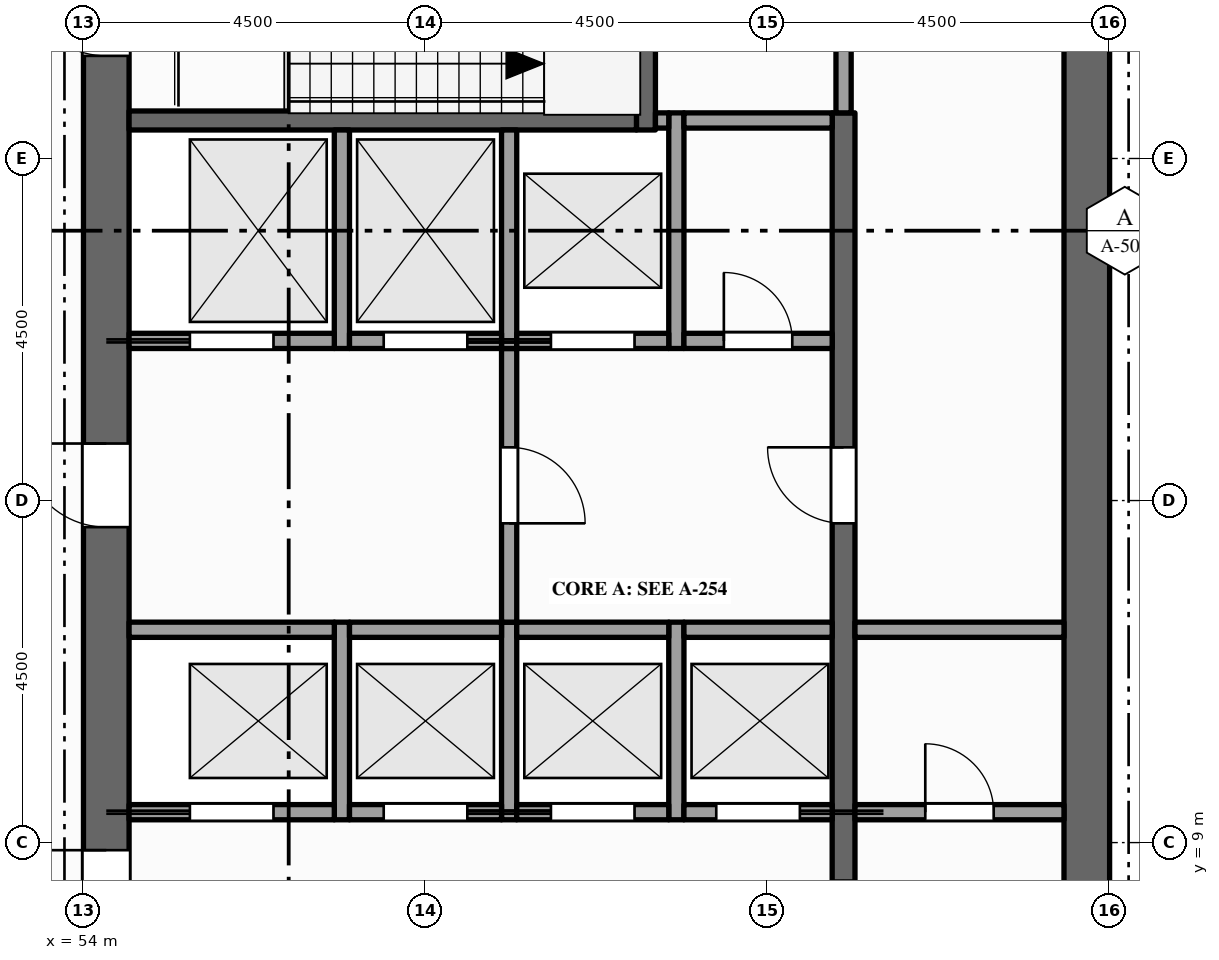
"""IFC4 building model, lengths in metres.
Left out: names, types, materials, properties, quantities, classifications, styles, units other than length and angle.
Written with IfcOpenShell. Run it as: python <this file> out.ifc"""

import sys

from ifc_helpers import new_model, si_unit, direction, frame, frame_2d, origin, place, context, subcontext, project, spatial, rectangle, extrude, element, fill, save


model = new_model("IFC4")
c1 = context("Model", 3, precision=1e-05, world=origin(), true_north=direction((0.0, 1.0)))
c2 = subcontext(c1, "Body", "Model", "MODEL_VIEW")
j1 = project(units=[si_unit("LENGTHUNIT", "METRE"), si_unit("PLANEANGLEUNIT", "RADIAN")], contexts=[c1])
p1 = place(None, origin())
s1 = spatial("IfcSite", under=j1, at=p1, CompositionType="ELEMENT")
p2 = place(p1, origin())
s2 = spatial("IfcBuilding", under=s1, at=p2, CompositionType="ELEMENT")
p3 = place(p2, frame((0.0, 0.0, 305.0)))
s3 = spatial("IfcBuildingStorey", under=s2, at=p3, CompositionType="ELEMENT", Elevation=305.0)
p4 = place(p3, frame((54.3, 0.6, -0.15), z_axis=(0.0, 0.0, 1.0), x_axis=(0.0, 1.0, 0.0)))
e1 = element("IfcWall", 1, at=p4, inside=s3, PredefinedType="SHEAR", context=c2, shape_type="SweptSolid", body=[
    extrude(rectangle(XDim=21.3, YDim=0.6, at=frame_2d((10.65, 0.0))), origin(), (0.0, 0.0, 1.0), 4.5),
])
p5 = place(p4, frame((6.5, 0.0, 0.15)))
e2 = element("IfcOpeningElement", 2, at=p5, cuts=e1, PredefinedType="OPENING", context=c2, shape_type="SweptSolid", body=[
    extrude(rectangle(XDim=1.8, YDim=2.1, at=frame_2d((0.9, 1.05))), frame((0.0, 0.31, 0.0), z_axis=(0.0, -1.0, 0.0), x_axis=(1.0, 0.0, 0.0)), (0.0, 0.0, 1.0), 0.62),
])
p6 = place(p4, frame((12.55, 0.0, 0.15)))
e3 = element("IfcOpeningElement", 3, at=p6, cuts=e1, PredefinedType="OPENING", context=c2, shape_type="SweptSolid", body=[
    extrude(rectangle(XDim=1.1, YDim=2.1, at=frame_2d((0.55, 1.05))), frame((0.0, 0.31, 0.0), z_axis=(0.0, -1.0, 0.0), x_axis=(1.0, 0.0, 0.0)), (0.0, 0.0, 1.0), 0.62),
])
p7 = place(p4, frame((1.55, 0.0, 0.15)))
e4 = element("IfcOpeningElement", 4, at=p7, cuts=e1, PredefinedType="OPENING", context=c2, shape_type="SweptSolid", body=[
    extrude(rectangle(XDim=1.1, YDim=2.1, at=frame_2d((0.55, 1.05))), frame((0.0, 0.31, 0.0), z_axis=(0.0, -1.0, 0.0), x_axis=(1.0, 0.0, 0.0)), (0.0, 0.0, 1.0), 0.62),
])
p8 = place(p4, frame((18.75, 0.0, 0.15)))
e5 = element("IfcOpeningElement", 5, at=p8, cuts=e1, PredefinedType="OPENING", context=c2, shape_type="SweptSolid", body=[
    extrude(rectangle(XDim=1.1, YDim=2.1, at=frame_2d((0.55, 1.05))), frame((0.0, 0.31, 0.0), z_axis=(0.0, -1.0, 0.0), x_axis=(1.0, 0.0, 0.0)), (0.0, 0.0, 1.0), 0.62),
])
p9 = place(p3, frame((67.2, 0.6, -0.15), z_axis=(0.0, 0.0, 1.0), x_axis=(0.0, 1.0, 0.0)))
e6 = element("IfcWall", 6, at=p9, inside=s3, PredefinedType="SHEAR", context=c2, shape_type="SweptSolid", body=[
    extrude(rectangle(XDim=21.3, YDim=0.6, at=frame_2d((10.65, 0.0))), origin(), (0.0, 0.0, 1.0), 4.5),
])
p10 = place(p3, frame((57.4, 9.3, 0.0), z_axis=(0.0, 0.0, 1.0), x_axis=(0.0, 1.0, 0.0)))
e7 = element("IfcWall", 7, at=p10, inside=s3, PredefinedType="SOLIDWALL", context=c2, shape_type="SweptSolid", body=[
    extrude(rectangle(XDim=2.6, YDim=0.2, at=frame_2d((1.3, 0.0))), origin(), (0.0, 0.0, 1.0), 4.35),
])
p11 = place(p3, frame((57.4, 15.5, 0.0), z_axis=(0.0, 0.0, 1.0), x_axis=(0.0, 1.0, 0.0)))
e8 = element("IfcWall", 8, at=p11, inside=s3, PredefinedType="SOLIDWALL", context=c2, shape_type="SweptSolid", body=[
    extrude(rectangle(XDim=2.875, YDim=0.2, at=frame_2d((1.438, 0.0))), origin(), (0.0, 0.0, 1.0), 4.35),
])
p12 = place(p3, frame((59.6, 9.3, 0.0), z_axis=(0.0, 0.0, 1.0), x_axis=(0.0, 1.0, 0.0)))
e9 = element("IfcWall", 9, at=p12, inside=s3, PredefinedType="SOLIDWALL", context=c2, shape_type="SweptSolid", body=[
    extrude(rectangle(XDim=2.6, YDim=0.2, at=frame_2d((1.3, 0.0))), origin(), (0.0, 0.0, 1.0), 4.35),
])
p13 = place(p3, frame((59.6, 11.9, 0.0), z_axis=(0.0, 0.0, 1.0), x_axis=(0.0, 1.0, 0.0)))
e10 = element("IfcWall", 10, at=p13, inside=s3, PredefinedType="PARTITIONING", context=c2, shape_type="SweptSolid", body=[
    extrude(rectangle(XDim=3.6, YDim=0.2, at=frame_2d((1.8, 0.0))), origin(), (0.0, 0.0, 1.0), 4.35),
])
p14 = place(p13, frame((1.3, 0.0, 0.0)))
e11 = element("IfcOpeningElement", 11, at=p14, cuts=e10, PredefinedType="OPENING", context=c2, shape_type="SweptSolid", body=[
    extrude(rectangle(XDim=1.0, YDim=2.1, at=frame_2d((0.5, 1.05))), frame((0.0, 0.11, 0.0), z_axis=(0.0, -1.0, 0.0), x_axis=(1.0, 0.0, 0.0)), (0.0, 0.0, 1.0), 0.22),
])
p15 = place(p3, frame((59.6, 15.5, 0.0), z_axis=(0.0, 0.0, 1.0), x_axis=(0.0, 1.0, 0.0)))
e12 = element("IfcWall", 12, at=p15, inside=s3, PredefinedType="SOLIDWALL", context=c2, shape_type="SweptSolid", body=[
    extrude(rectangle(XDim=2.875, YDim=0.2, at=frame_2d((1.438, 0.0))), origin(), (0.0, 0.0, 1.0), 4.35),
])
p16 = place(p3, frame((61.4, 18.375, 0.0), z_axis=(0.0, 0.0, 1.0), x_axis=(0.0, 1.0, 0.0)))
e13 = element("IfcWall", 13, at=p16, inside=s3, PredefinedType="SHEAR", context=c2, shape_type="SweptSolid", body=[
    extrude(rectangle(XDim=3.525, YDim=0.25, at=frame_2d((1.762, 0.0))), origin(), (0.0, 0.0, 1.0), 4.35),
])
p17 = place(p3, frame((61.8, 9.3, 0.0), z_axis=(0.0, 0.0, 1.0), x_axis=(0.0, 1.0, 0.0)))
e14 = element("IfcWall", 14, at=p17, inside=s3, PredefinedType="SOLIDWALL", context=c2, shape_type="SweptSolid", body=[
    extrude(rectangle(XDim=2.6, YDim=0.2, at=frame_2d((1.3, 0.0))), origin(), (0.0, 0.0, 1.0), 4.35),
])
p18 = place(p3, frame((61.8, 15.5, 0.0), z_axis=(0.0, 0.0, 1.0), x_axis=(0.0, 1.0, 0.0)))
e15 = element("IfcWall", 15, at=p18, inside=s3, PredefinedType="SOLIDWALL", context=c2, shape_type="SweptSolid", body=[
    extrude(rectangle(XDim=3.1, YDim=0.2, at=frame_2d((1.55, 0.0))), origin(), (0.0, 0.0, 1.0), 4.35),
])
p19 = place(p3, frame((64.0, 4.1, 0.0), z_axis=(0.0, 0.0, 1.0), x_axis=(0.0, 1.0, 0.0)))
e16 = element("IfcWall", 16, at=p19, inside=s3, PredefinedType="SHEAR", context=c2, shape_type="SweptSolid", body=[
    extrude(rectangle(XDim=14.5, YDim=0.3, at=frame_2d((7.25, 0.0))), origin(), (0.0, 0.0, 1.0), 4.35),
])
p20 = place(p19, frame((3.4, 0.0, 0.0)))
e17 = element("IfcOpeningElement", 17, at=p20, cuts=e16, PredefinedType="OPENING", context=c2, shape_type="SweptSolid", body=[
    extrude(rectangle(XDim=1.0, YDim=2.1, at=frame_2d((0.5, 1.05))), frame((0.0, 0.16, 0.0), z_axis=(0.0, -1.0, 0.0), x_axis=(1.0, 0.0, 0.0)), (0.0, 0.0, 1.0), 0.32),
])
p21 = place(p19, frame((9.1, 0.0, 0.0)))
e18 = element("IfcOpeningElement", 18, at=p21, cuts=e16, PredefinedType="OPENING", context=c2, shape_type="SweptSolid", body=[
    extrude(rectangle(XDim=1.0, YDim=2.1, at=frame_2d((0.5, 1.05))), frame((0.0, 0.16, 0.0), z_axis=(0.0, -1.0, 0.0), x_axis=(1.0, 0.0, 0.0)), (0.0, 0.0, 1.0), 0.32),
])
p22 = place(p3, frame((64.0, 18.6, 0.0), z_axis=(0.0, 0.0, 1.0), x_axis=(0.0, 1.0, 0.0)))
e19 = element("IfcWall", 19, at=p22, inside=s3, PredefinedType="PARTITIONING", context=c2, shape_type="SweptSolid", body=[
    extrude(rectangle(XDim=3.3, YDim=0.2, at=frame_2d((1.65, 0.0))), origin(), (0.0, 0.0, 1.0), 4.35),
])
p23 = place(p22, frame((1.2, 0.0, 0.0)))
e20 = element("IfcOpeningElement", 20, at=p23, cuts=e19, PredefinedType="OPENING", context=c2, shape_type="SweptSolid", body=[
    extrude(rectangle(XDim=0.9, YDim=2.1, at=frame_2d((0.45, 1.05))), frame((0.0, 0.11, 0.0), z_axis=(0.0, -1.0, 0.0), x_axis=(1.0, 0.0, 0.0)), (0.0, 0.0, 1.0), 0.22),
])
p24 = place(p3, frame((54.6, 9.4, 0.0), z_axis=(0.0, 0.0, 1.0), x_axis=(1.0, 0.0, 0.0)))
e21 = element("IfcWall", 21, at=p24, inside=s3, PredefinedType="SOLIDWALL", context=c2, shape_type="SweptSolid", body=[
    extrude(rectangle(XDim=2.7, YDim=0.2, at=frame_2d((1.35, 0.0))), origin(), (0.0, 0.0, 1.0), 4.35),
])
p25 = place(p24, frame((0.8, 0.0, 0.012)))
e22 = element("IfcOpeningElement", 22, at=p25, cuts=e21, PredefinedType="OPENING", context=c2, shape_type="SweptSolid", body=[
    extrude(rectangle(XDim=1.1, YDim=2.1, at=frame_2d((0.55, 1.05))), frame((0.0, 0.11, 0.0), z_axis=(0.0, -1.0, 0.0), x_axis=(1.0, 0.0, 0.0)), (0.0, 0.0, 1.0), 0.22),
])
p26 = place(p3, frame((57.5, 9.4, 0.0), z_axis=(0.0, 0.0, 1.0), x_axis=(1.0, 0.0, 0.0)))
e23 = element("IfcWall", 23, at=p26, inside=s3, PredefinedType="SOLIDWALL", context=c2, shape_type="SweptSolid", body=[
    extrude(rectangle(XDim=2.0, YDim=0.2, at=frame_2d((1.0, 0.0))), origin(), (0.0, 0.0, 1.0), 4.35),
])
p27 = place(p26, frame((0.45, 0.0, 0.012)))
e24 = element("IfcOpeningElement", 24, at=p27, cuts=e23, PredefinedType="OPENING", context=c2, shape_type="SweptSolid", body=[
    extrude(rectangle(XDim=1.1, YDim=2.1, at=frame_2d((0.55, 1.05))), frame((0.0, 0.11, 0.0), z_axis=(0.0, -1.0, 0.0), x_axis=(1.0, 0.0, 0.0)), (0.0, 0.0, 1.0), 0.22),
])
p28 = place(p3, frame((59.7, 9.4, 0.0), z_axis=(0.0, 0.0, 1.0), x_axis=(1.0, 0.0, 0.0)))
e25 = element("IfcWall", 25, at=p28, inside=s3, PredefinedType="SOLIDWALL", context=c2, shape_type="SweptSolid", body=[
    extrude(rectangle(XDim=2.0, YDim=0.2, at=frame_2d((1.0, 0.0))), origin(), (0.0, 0.0, 1.0), 4.35),
])
p29 = place(p28, frame((0.45, 0.0, 0.012)))
e26 = element("IfcOpeningElement", 26, at=p29, cuts=e25, PredefinedType="OPENING", context=c2, shape_type="SweptSolid", body=[
    extrude(rectangle(XDim=1.1, YDim=2.1, at=frame_2d((0.55, 1.05))), frame((0.0, 0.11, 0.0), z_axis=(0.0, -1.0, 0.0), x_axis=(1.0, 0.0, 0.0)), (0.0, 0.0, 1.0), 0.22),
])
p30 = place(p3, frame((61.9, 9.4, 0.0), z_axis=(0.0, 0.0, 1.0), x_axis=(1.0, 0.0, 0.0)))
e27 = element("IfcWall", 27, at=p30, inside=s3, PredefinedType="SOLIDWALL", context=c2, shape_type="SweptSolid", body=[
    extrude(rectangle(XDim=1.95, YDim=0.2, at=frame_2d((0.975, 0.0))), origin(), (0.0, 0.0, 1.0), 4.35),
])
p31 = place(p30, frame((0.425, 0.0, 0.012)))
e28 = element("IfcOpeningElement", 28, at=p31, cuts=e27, PredefinedType="OPENING", context=c2, shape_type="SweptSolid", body=[
    extrude(rectangle(XDim=1.1, YDim=2.1, at=frame_2d((0.55, 1.05))), frame((0.0, 0.11, 0.0), z_axis=(0.0, -1.0, 0.0), x_axis=(1.0, 0.0, 0.0)), (0.0, 0.0, 1.0), 0.22),
])
p32 = place(p3, frame((64.15, 9.4, 0.0), z_axis=(0.0, 0.0, 1.0), x_axis=(1.0, 0.0, 0.0)))
e29 = element("IfcWall", 29, at=p32, inside=s3, PredefinedType="PARTITIONING", context=c2, shape_type="SweptSolid", body=[
    extrude(rectangle(XDim=2.75, YDim=0.2, at=frame_2d((1.375, 0.0))), origin(), (0.0, 0.0, 1.0), 4.35),
])
p33 = place(p32, frame((0.925, 0.0, 0.0)))
e30 = element("IfcOpeningElement", 30, at=p33, cuts=e29, PredefinedType="OPENING", context=c2, shape_type="SweptSolid", body=[
    extrude(rectangle(XDim=0.9, YDim=2.1, at=frame_2d((0.45, 1.05))), frame((0.0, 0.11, 0.0), z_axis=(0.0, -1.0, 0.0), x_axis=(1.0, 0.0, 0.0)), (0.0, 0.0, 1.0), 0.22),
])
p34 = place(p3, frame((54.6, 11.8, 0.0), z_axis=(0.0, 0.0, 1.0), x_axis=(1.0, 0.0, 0.0)))
e31 = element("IfcWall", 31, at=p34, inside=s3, PredefinedType="SOLIDWALL", context=c2, shape_type="SweptSolid", body=[
    extrude(rectangle(XDim=2.7, YDim=0.2, at=frame_2d((1.35, 0.0))), origin(), (0.0, 0.0, 1.0), 4.35),
])
for number, where, z_axis, x_axis in (
    (32, (57.5, 11.8, 0.0), (0.0, 0.0, 1.0), (1.0, 0.0, 0.0)),
    (33, (59.7, 11.8, 0.0), (0.0, 0.0, 1.0), (1.0, 0.0, 0.0)),
):
    element("IfcWall", number, at=place(p3, frame(where, z_axis=z_axis, x_axis=x_axis)), inside=s3, PredefinedType="SOLIDWALL", context=c2, shape_type="SweptSolid", body=[
        extrude(rectangle(XDim=2.0, YDim=0.2, at=frame_2d((1.0, 0.0))), origin(), (0.0, 0.0, 1.0), 4.35),
    ])
p35 = place(p3, frame((61.9, 11.8, 0.0), z_axis=(0.0, 0.0, 1.0), x_axis=(1.0, 0.0, 0.0)))
e34 = element("IfcWall", 34, at=p35, inside=s3, PredefinedType="SOLIDWALL", context=c2, shape_type="SweptSolid", body=[
    extrude(rectangle(XDim=1.95, YDim=0.2, at=frame_2d((0.975, 0.0))), origin(), (0.0, 0.0, 1.0), 4.35),
])
p36 = place(p3, frame((64.15, 11.8, 0.0), z_axis=(0.0, 0.0, 1.0), x_axis=(1.0, 0.0, 0.0)))
e35 = element("IfcWall", 35, at=p36, inside=s3, PredefinedType="PARTITIONING", context=c2, shape_type="SweptSolid", body=[
    extrude(rectangle(XDim=2.75, YDim=0.2, at=frame_2d((1.375, 0.0))), origin(), (0.0, 0.0, 1.0), 4.35),
])
p37 = place(p3, frame((54.6, 15.6, 0.0), z_axis=(0.0, 0.0, 1.0), x_axis=(1.0, 0.0, 0.0)))
e36 = element("IfcWall", 36, at=p37, inside=s3, PredefinedType="SOLIDWALL", context=c2, shape_type="SweptSolid", body=[
    extrude(rectangle(XDim=2.7, YDim=0.2, at=frame_2d((1.35, 0.0))), origin(), (0.0, 0.0, 1.0), 4.35),
])
p38 = place(p37, frame((0.8, 0.0, 0.012)))
e37 = element("IfcOpeningElement", 37, at=p38, cuts=e36, PredefinedType="OPENING", context=c2, shape_type="SweptSolid", body=[
    extrude(rectangle(XDim=1.1, YDim=2.1, at=frame_2d((0.55, 1.05))), frame((0.0, 0.11, 0.0), z_axis=(0.0, -1.0, 0.0), x_axis=(1.0, 0.0, 0.0)), (0.0, 0.0, 1.0), 0.22),
])
p39 = place(p3, frame((57.5, 15.6, 0.0), z_axis=(0.0, 0.0, 1.0), x_axis=(1.0, 0.0, 0.0)))
e38 = element("IfcWall", 38, at=p39, inside=s3, PredefinedType="SOLIDWALL", context=c2, shape_type="SweptSolid", body=[
    extrude(rectangle(XDim=2.0, YDim=0.2, at=frame_2d((1.0, 0.0))), origin(), (0.0, 0.0, 1.0), 4.35),
])
p40 = place(p39, frame((0.45, 0.0, 0.012)))
e39 = element("IfcOpeningElement", 39, at=p40, cuts=e38, PredefinedType="OPENING", context=c2, shape_type="SweptSolid", body=[
    extrude(rectangle(XDim=1.1, YDim=2.1, at=frame_2d((0.55, 1.05))), frame((0.0, 0.11, 0.0), z_axis=(0.0, -1.0, 0.0), x_axis=(1.0, 0.0, 0.0)), (0.0, 0.0, 1.0), 0.22),
])
p41 = place(p3, frame((59.7, 15.6, 0.0), z_axis=(0.0, 0.0, 1.0), x_axis=(1.0, 0.0, 0.0)))
e40 = element("IfcWall", 40, at=p41, inside=s3, PredefinedType="SOLIDWALL", context=c2, shape_type="SweptSolid", body=[
    extrude(rectangle(XDim=2.0, YDim=0.2, at=frame_2d((1.0, 0.0))), origin(), (0.0, 0.0, 1.0), 4.35),
])
p42 = place(p41, frame((0.45, 0.0, 0.012)))
e41 = element("IfcOpeningElement", 41, at=p42, cuts=e40, PredefinedType="OPENING", context=c2, shape_type="SweptSolid", body=[
    extrude(rectangle(XDim=1.1, YDim=2.1, at=frame_2d((0.55, 1.05))), frame((0.0, 0.11, 0.0), z_axis=(0.0, -1.0, 0.0), x_axis=(1.0, 0.0, 0.0)), (0.0, 0.0, 1.0), 0.22),
])
p43 = place(p3, frame((61.9, 15.6, 0.0), z_axis=(0.0, 0.0, 1.0), x_axis=(1.0, 0.0, 0.0)))
e42 = element("IfcWall", 42, at=p43, inside=s3, PredefinedType="PARTITIONING", context=c2, shape_type="SweptSolid", body=[
    extrude(rectangle(XDim=1.95, YDim=0.2, at=frame_2d((0.975, 0.0))), origin(), (0.0, 0.0, 1.0), 4.35),
])
p44 = place(p43, frame((0.525, 0.0, 0.0)))
e43 = element("IfcOpeningElement", 43, at=p44, cuts=e42, PredefinedType="OPENING", context=c2, shape_type="SweptSolid", body=[
    extrude(rectangle(XDim=0.9, YDim=2.1, at=frame_2d((0.45, 1.05))), frame((0.0, 0.11, 0.0), z_axis=(0.0, -1.0, 0.0), x_axis=(1.0, 0.0, 0.0)), (0.0, 0.0, 1.0), 0.22),
])
p45 = place(p3, frame((54.6, 18.5, 0.0), z_axis=(0.0, 0.0, 1.0), x_axis=(1.0, 0.0, 0.0)))
e44 = element("IfcWall", 44, at=p45, inside=s3, PredefinedType="SHEAR", context=c2, shape_type="SweptSolid", body=[
    extrude(rectangle(XDim=6.675, YDim=0.25, at=frame_2d((3.337, 0.0))), origin(), (0.0, 0.0, 1.0), 4.35),
])
p46 = place(p3, frame((61.525, 18.5, 0.0), z_axis=(0.0, 0.0, 1.0), x_axis=(1.0, 0.0, 0.0)))
e45 = element("IfcWall", 45, at=p46, inside=s3, PredefinedType="SOLIDWALL", context=c2, shape_type="SweptSolid", body=[
    extrude(rectangle(XDim=0.175, YDim=0.2, at=frame_2d((0.087, 0.0))), origin(), (0.0, 0.0, 1.0), 4.35),
])
p47 = place(p3, frame((61.9, 18.5, 0.0), z_axis=(0.0, 0.0, 1.0), x_axis=(1.0, 0.0, 0.0)))
e46 = element("IfcWall", 46, at=p47, inside=s3, PredefinedType="PARTITIONING", context=c2, shape_type="SweptSolid", body=[
    extrude(rectangle(XDim=1.95, YDim=0.2, at=frame_2d((0.975, 0.0))), origin(), (0.0, 0.0, 1.0), 4.35),
])
p48 = place(p25, origin())
e47 = element("IfcDoor", 47, at=p48, inside=s3, OperationType="SLIDING_TO_LEFT", PredefinedType="DOOR", context=c2, shape_type="SweptSolid", body=[
    extrude(rectangle(XDim=1.1, YDim=2.1, at=frame_2d((0.55, 1.05))), frame((0.0, 0.025, 0.0), z_axis=(0.0, -1.0, 0.0), x_axis=(1.0, 0.0, 0.0)), (0.0, 0.0, 1.0), 0.05),
])
fill(e22, e47)
p49 = place(p27, origin())
e48 = element("IfcDoor", 48, at=p49, inside=s3, OperationType="SLIDING_TO_RIGHT", PredefinedType="DOOR", context=c2, shape_type="SweptSolid", body=[
    extrude(rectangle(XDim=1.1, YDim=2.1, at=frame_2d((0.55, 1.05))), frame((0.0, 0.025, 0.0), z_axis=(0.0, -1.0, 0.0), x_axis=(1.0, 0.0, 0.0)), (0.0, 0.0, 1.0), 0.05),
])
fill(e24, e48)
p50 = place(p29, origin())
e49 = element("IfcDoor", 49, at=p50, inside=s3, OperationType="SLIDING_TO_LEFT", PredefinedType="DOOR", context=c2, shape_type="SweptSolid", body=[
    extrude(rectangle(XDim=1.1, YDim=2.1, at=frame_2d((0.55, 1.05))), frame((0.0, 0.025, 0.0), z_axis=(0.0, -1.0, 0.0), x_axis=(1.0, 0.0, 0.0)), (0.0, 0.0, 1.0), 0.05),
])
fill(e26, e49)
p51 = place(p31, origin())
e50 = element("IfcDoor", 50, at=p51, inside=s3, OperationType="SLIDING_TO_RIGHT", PredefinedType="DOOR", context=c2, shape_type="SweptSolid", body=[
    extrude(rectangle(XDim=1.1, YDim=2.1, at=frame_2d((0.55, 1.05))), frame((0.0, 0.025, 0.0), z_axis=(0.0, -1.0, 0.0), x_axis=(1.0, 0.0, 0.0)), (0.0, 0.0, 1.0), 0.05),
])
fill(e28, e50)
p52 = place(p38, origin())
e51 = element("IfcDoor", 51, at=p52, inside=s3, OperationType="SLIDING_TO_LEFT", PredefinedType="DOOR", context=c2, shape_type="SweptSolid", body=[
    extrude(rectangle(XDim=1.1, YDim=2.1, at=frame_2d((0.55, 1.05))), frame((0.0, 0.025, 0.0), z_axis=(0.0, -1.0, 0.0), x_axis=(1.0, 0.0, 0.0)), (0.0, 0.0, 1.0), 0.05),
])
fill(e37, e51)
p53 = place(p40, origin())
e52 = element("IfcDoor", 52, at=p53, inside=s3, OperationType="SLIDING_TO_RIGHT", PredefinedType="DOOR", context=c2, shape_type="SweptSolid", body=[
    extrude(rectangle(XDim=1.1, YDim=2.1, at=frame_2d((0.55, 1.05))), frame((0.0, 0.025, 0.0), z_axis=(0.0, -1.0, 0.0), x_axis=(1.0, 0.0, 0.0)), (0.0, 0.0, 1.0), 0.05),
])
fill(e39, e52)
p54 = place(p42, origin())
e53 = element("IfcDoor", 53, at=p54, inside=s3, OperationType="SLIDING_TO_LEFT", PredefinedType="DOOR", context=c2, shape_type="SweptSolid", body=[
    extrude(rectangle(XDim=1.1, YDim=2.1, at=frame_2d((0.55, 1.05))), frame((0.0, 0.025, 0.0), z_axis=(0.0, -1.0, 0.0), x_axis=(1.0, 0.0, 0.0)), (0.0, 0.0, 1.0), 0.05),
])
fill(e41, e53)
p55 = place(p5, origin())
e54 = element("IfcDoor", 54, at=p55, inside=s3, OperationType="DOUBLE_DOOR_SINGLE_SWING", PredefinedType="DOOR", context=c2, shape_type="SweptSolid", body=[
    extrude(rectangle(XDim=1.8, YDim=2.1, at=frame_2d((0.9, 1.05))), frame((0.0, 0.025, 0.0), z_axis=(0.0, -1.0, 0.0), x_axis=(1.0, 0.0, 0.0)), (0.0, 0.0, 1.0), 0.05),
])
fill(e2, e54)
p56 = place(p6, origin())
e55 = element("IfcDoor", 55, at=p56, inside=s3, OperationType="SINGLE_SWING_RIGHT", PredefinedType="DOOR", context=c2, shape_type="SweptSolid", body=[
    extrude(rectangle(XDim=1.1, YDim=2.1, at=frame_2d((0.55, 1.05))), frame((0.0, 0.025, 0.0), z_axis=(0.0, -1.0, 0.0), x_axis=(1.0, 0.0, 0.0)), (0.0, 0.0, 1.0), 0.05),
])
fill(e3, e55)
p57 = place(p14, origin())
e56 = element("IfcDoor", 56, at=p57, inside=s3, OperationType="SINGLE_SWING_LEFT", PredefinedType="DOOR", context=c2, shape_type="SweptSolid", body=[
    extrude(rectangle(XDim=1.0, YDim=2.1, at=frame_2d((0.5, 1.05))), frame((0.0, 0.025, 0.0), z_axis=(0.0, -1.0, 0.0), x_axis=(1.0, 0.0, 0.0)), (0.0, 0.0, 1.0), 0.05),
])
fill(e11, e56)
p58 = place(p21, origin())
e57 = element("IfcDoor", 57, at=p58, inside=s3, OperationType="SINGLE_SWING_RIGHT", PredefinedType="DOOR", context=c2, shape_type="SweptSolid", body=[
    extrude(rectangle(XDim=1.0, YDim=2.1, at=frame_2d((0.5, 1.05))), frame((0.0, 0.025, 0.0), z_axis=(0.0, -1.0, 0.0), x_axis=(1.0, 0.0, 0.0)), (0.0, 0.0, 1.0), 0.05),
])
fill(e18, e57)
p59 = place(p33, origin())
e58 = element("IfcDoor", 58, at=p59, inside=s3, OperationType="SINGLE_SWING_LEFT", PredefinedType="DOOR", context=c2, shape_type="SweptSolid", body=[
    extrude(rectangle(XDim=0.9, YDim=2.1, at=frame_2d((0.45, 1.05))), frame((0.0, 0.025, 0.0), z_axis=(0.0, -1.0, 0.0), x_axis=(1.0, 0.0, 0.0)), (0.0, 0.0, 1.0), 0.05),
])
fill(e30, e58)
p60 = place(p8, origin())
e59 = element("IfcDoor", 59, at=p60, inside=s3, OperationType="SINGLE_SWING_RIGHT", PredefinedType="DOOR", context=c2, shape_type="SweptSolid", body=[
    extrude(rectangle(XDim=1.1, YDim=2.1, at=frame_2d((0.55, 1.05))), frame((0.0, 0.025, 0.0), z_axis=(0.0, -1.0, 0.0), x_axis=(1.0, 0.0, 0.0)), (0.0, 0.0, 1.0), 0.05),
])
fill(e5, e59)
p61 = place(p44, origin())
e60 = element("IfcDoor", 60, at=p61, inside=s3, OperationType="SINGLE_SWING_LEFT", PredefinedType="DOOR", context=c2, shape_type="SweptSolid", body=[
    extrude(rectangle(XDim=0.9, YDim=2.1, at=frame_2d((0.45, 1.05))), frame((0.0, 0.025, 0.0), z_axis=(0.0, -1.0, 0.0), x_axis=(1.0, 0.0, 0.0)), (0.0, 0.0, 1.0), 0.05),
])
fill(e43, e60)
save(model, sys.argv[1])
